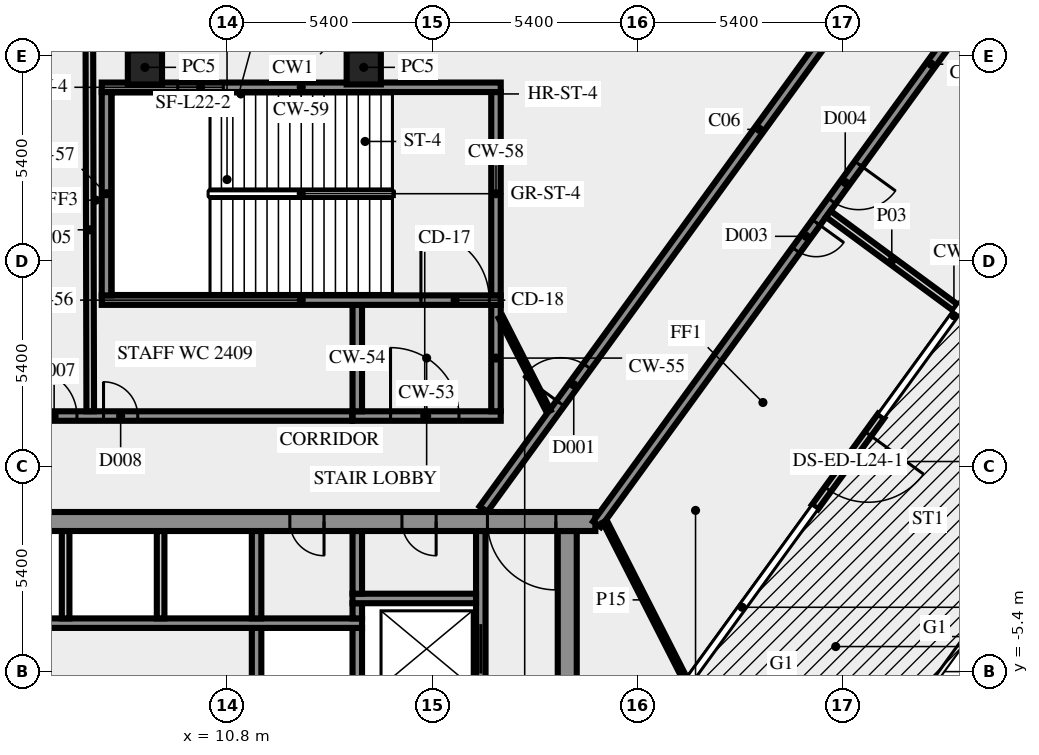
"""IFC4 building model, lengths in metres.
Left out: names, types, materials, properties, quantities, classifications, styles, units other than length and angle.
Written with IfcOpenShell. Run it as: python <this file> out.ifc"""

import sys

from ifc_helpers import new_model, si_unit, direction, frame, frame_2d, origin, origin_2d, place, context, subcontext, project, spatial, rectangle, extrude, element, fill, save


model = new_model("IFC4")
c1 = context("Model", 3, precision=1e-05, world=origin(), true_north=direction((0.0, 1.0)))
c2 = subcontext(c1, "Body", "Model", "MODEL_VIEW")
j1 = project(units=[si_unit("LENGTHUNIT", "METRE"), si_unit("PLANEANGLEUNIT", "RADIAN")], contexts=[c1])
p1 = place(None, origin())
s1 = spatial("IfcSite", under=j1, at=p1, CompositionType="ELEMENT")
p2 = place(p1, origin())
s2 = spatial("IfcBuilding", under=s1, at=p2, CompositionType="ELEMENT")
p3 = place(p2, frame((0.0, 0.0, 105.0)))
s3 = spatial("IfcBuildingStorey", under=s2, at=p3, CompositionType="ELEMENT", Elevation=105.0)
for number, where, z_axis, x_axis in (
    (1, (14.395, 10.5, 0.0), (0.0, 0.0, 1.0), (-1.0, 0.0, 0.0)),
    (2, (8.637, 10.5, 0.0), (0.0, 0.0, 1.0), (-1.0, 0.0, 0.0)),
):
    element("IfcColumn", number, at=place(p3, frame(where, z_axis=z_axis, x_axis=x_axis)), inside=s3, PredefinedType="COLUMN", context=c2, shape_type="SweptSolid", body=[
        extrude(rectangle(XDim=0.9, YDim=0.9, at=origin_2d()), origin(), (0.0, 0.0, 1.0), 3.65),
    ])
p4 = place(p3, frame((28.01, 1.327, 0.0), z_axis=(0.0, 0.0, 1.0), x_axis=(-0.587735577821, -0.809053082661, 0.0)))
e3 = element("IfcWall", 3, at=p4, inside=s3, PredefinedType="SOLIDWALL", context=c2, shape_type="SweptSolid", body=[
    extrude(rectangle(XDim=2.963, YDim=0.2, at=frame_2d((1.481, 0.0))), origin(), (0.0, 0.0, 1.0), 3.65),
])
p5 = place(p4, frame((0.582, 0.0, 0.0)))
e4 = element("IfcOpeningElement", 4, at=p5, cuts=e3, PredefinedType="OPENING", context=c2, shape_type="SweptSolid", body=[
    extrude(rectangle(XDim=1.8, YDim=2.4, at=frame_2d((0.9, 1.2))), frame((0.0, 0.11, 0.0), z_axis=(0.0, -1.0, 0.0), x_axis=(1.0, 0.0, 0.0)), (0.0, 0.0, 1.0), 0.22),
])
p6 = place(p3, frame((19.75, -10.5, 0.0), z_axis=(0.0, 0.0, 1.0), x_axis=(0.0, 1.0, 0.0)))
e5 = element("IfcWall", 5, at=p6, inside=s3, PredefinedType="SHEAR", context=c2, shape_type="SweptSolid", body=[
    extrude(rectangle(XDim=8.8, YDim=0.5, at=frame_2d((4.4, 0.0))), origin(), (0.0, 0.0, 1.0), 3.65),
])
for number, where, z_axis, x_axis in (
    (6, (11.575, -6.0, 0.0), (0.0, 0.0, 1.0), (0.0, 1.0, 0.0)),
    (7, (14.225, -6.0, 0.0), (0.0, 0.0, 1.0), (0.0, 1.0, 0.0)),
):
    element("IfcWall", number, at=place(p3, frame(where, z_axis=z_axis, x_axis=x_axis)), inside=s3, PredefinedType="SHEAR", context=c2, shape_type="SweptSolid", body=[
        extrude(rectangle(XDim=1.75, YDim=0.25, at=frame_2d((0.875, 0.0))), origin(), (0.0, 0.0, 1.0), 3.65),
    ])
p7 = place(p3, frame((17.475, -6.0, 0.0), z_axis=(0.0, 0.0, 1.0), x_axis=(0.0, 1.0, 0.0)))
e8 = element("IfcWall", 8, at=p7, inside=s3, PredefinedType="SHEAR", context=c2, shape_type="SweptSolid", body=[
    extrude(rectangle(XDim=4.3, YDim=0.25, at=frame_2d((2.15, 0.0))), origin(), (0.0, 0.0, 1.0), 3.65),
])
p8 = place(p7, frame((0.55, 0.0, 0.0)))
e9 = element("IfcOpeningElement", 9, at=p8, cuts=e8, PredefinedType="OPENING", context=c2, shape_type="SweptSolid", body=[
    extrude(rectangle(XDim=1.3, YDim=2.1, at=frame_2d((0.65, 1.05))), frame((0.0, 0.135, 0.0), z_axis=(0.0, -1.0, 0.0), x_axis=(1.0, 0.0, 0.0)), (0.0, 0.0, 1.0), 0.27),
])
p9 = place(p3, frame((1.45, -4.125, 0.0), z_axis=(0.0, 0.0, 1.0), x_axis=(1.0, 0.0, 0.0)))
e10 = element("IfcWall", 10, at=p9, inside=s3, PredefinedType="SHEAR", context=c2, shape_type="SweptSolid", body=[
    extrude(rectangle(XDim=12.9, YDim=0.25, at=frame_2d((6.45, 0.0))), origin(), (0.0, 0.0, 1.0), 3.65),
])
p10 = place(p9, frame((0.7, 0.0, 0.0)))
e11 = element("IfcOpeningElement", 11, at=p10, cuts=e10, PredefinedType="OPENING", context=c2, shape_type="SweptSolid", body=[
    extrude(rectangle(XDim=1.3, YDim=2.1, at=frame_2d((0.65, 1.05))), frame((0.0, 0.135, 0.0), z_axis=(0.0, -1.0, 0.0), x_axis=(1.0, 0.0, 0.0)), (0.0, 0.0, 1.0), 0.27),
])
for number, where, z_axis, x_axis in (
    (12, (6.55, -4.0, 0.0), (0.0, 0.0, 1.0), (0.0, 1.0, 0.0)),
    (13, (9.05, -4.0, 0.0), (0.0, 0.0, 1.0), (0.0, 1.0, 0.0)),
):
    element("IfcWall", number, at=place(p3, frame(where, z_axis=z_axis, x_axis=x_axis)), inside=s3, PredefinedType="SOLIDWALL", context=c2, shape_type="SweptSolid", body=[
        extrude(rectangle(XDim=2.3, YDim=0.2, at=frame_2d((1.15, 0.0))), origin(), (0.0, 0.0, 1.0), 3.65),
    ])
p11 = place(p3, frame((11.575, -4.0, 0.0), z_axis=(0.0, 0.0, 1.0), x_axis=(0.0, 1.0, 0.0)))
e14 = element("IfcWall", 14, at=p11, inside=s3, PredefinedType="SHEAR", context=c2, shape_type="SweptSolid", body=[
    extrude(rectangle(XDim=2.3, YDim=0.25, at=frame_2d((1.15, 0.0))), origin(), (0.0, 0.0, 1.0), 3.65),
])
p12 = place(p3, frame((14.225, -4.0, 0.0), z_axis=(0.0, 0.0, 1.0), x_axis=(0.0, 1.0, 0.0)))
e15 = element("IfcWall", 15, at=p12, inside=s3, PredefinedType="SHEAR", context=c2, shape_type="SweptSolid", body=[
    extrude(rectangle(XDim=0.4, YDim=0.25, at=frame_2d((0.2, 0.0))), origin(), (0.0, 0.0, 1.0), 3.65),
])
p13 = place(p3, frame((14.1, -3.475, 0.0), z_axis=(0.0, 0.0, 1.0), x_axis=(1.0, 0.0, 0.0)))
e16 = element("IfcWall", 16, at=p13, inside=s3, PredefinedType="SHEAR", context=c2, shape_type="SweptSolid", body=[
    extrude(rectangle(XDim=3.25, YDim=0.25, at=frame_2d((1.625, 0.0))), origin(), (0.0, 0.0, 1.0), 3.65),
])
p14 = place(p3, frame((14.225, -3.35, 0.0), z_axis=(0.0, 0.0, 1.0), x_axis=(0.0, 1.0, 0.0)))
e17 = element("IfcWall", 17, at=p14, inside=s3, PredefinedType="SHEAR", context=c2, shape_type="SweptSolid", body=[
    extrude(rectangle(XDim=1.65, YDim=0.25, at=frame_2d((0.825, 0.0))), origin(), (0.0, 0.0, 1.0), 3.65),
])
p15 = place(p3, frame((20.49, -1.45, 0.0), z_axis=(0.0, 0.0, 1.0), x_axis=(-1.0, 0.0, 0.0)))
e18 = element("IfcWall", 18, at=p15, inside=s3, PredefinedType="SHEAR", context=c2, shape_type="SweptSolid", body=[
    extrude(rectangle(XDim=40.98, YDim=0.5, at=frame_2d((20.49, 0.0))), origin(), (0.0, 0.0, 1.0), 3.65),
])
p16 = place(p15, frame((38.14, 0.0, 0.0)))
e19 = element("IfcOpeningElement", 19, at=p16, cuts=e18, PredefinedType="OPENING", context=c2, shape_type="SweptSolid", body=[
    extrude(rectangle(XDim=1.8, YDim=2.1, at=frame_2d((0.9, 1.05))), frame((0.0, 0.26, 0.0), z_axis=(0.0, -1.0, 0.0), x_axis=(1.0, 0.0, 0.0)), (0.0, 0.0, 1.0), 0.52),
])
p17 = place(p15, frame((36.728, 0.0, 0.0)))
e20 = element("IfcOpeningElement", 20, at=p17, cuts=e18, PredefinedType="OPENING", context=c2, shape_type="SweptSolid", body=[
    extrude(rectangle(XDim=0.8, YDim=2.1, at=frame_2d((0.4, 1.05))), frame((0.0, 0.26, 0.0), z_axis=(0.0, -1.0, 0.0), x_axis=(1.0, 0.0, 0.0)), (0.0, 0.0, 1.0), 0.52),
])
p18 = place(p15, frame((35.153, 0.0, 0.0)))
e21 = element("IfcOpeningElement", 21, at=p18, cuts=e18, PredefinedType="OPENING", context=c2, shape_type="SweptSolid", body=[
    extrude(rectangle(XDim=0.8, YDim=2.1, at=frame_2d((0.4, 1.05))), frame((0.0, 0.26, 0.0), z_axis=(0.0, -1.0, 0.0), x_axis=(1.0, 0.0, 0.0)), (0.0, 0.0, 1.0), 0.52),
])
p19 = place(p15, frame((32.94, 0.0, 0.0)))
e22 = element("IfcOpeningElement", 22, at=p19, cuts=e18, PredefinedType="OPENING", context=c2, shape_type="SweptSolid", body=[
    extrude(rectangle(XDim=0.9, YDim=2.1, at=frame_2d((0.45, 1.05))), frame((0.0, 0.26, 0.0), z_axis=(0.0, -1.0, 0.0), x_axis=(1.0, 0.0, 0.0)), (0.0, 0.0, 1.0), 0.52),
])
p20 = place(p15, frame((19.59, 0.0, 0.0)))
e23 = element("IfcOpeningElement", 23, at=p20, cuts=e18, PredefinedType="OPENING", context=c2, shape_type="SweptSolid", body=[
    extrude(rectangle(XDim=2.0, YDim=2.1, at=frame_2d((1.0, 1.05))), frame((0.0, 0.26, 0.0), z_axis=(0.0, -1.0, 0.0), x_axis=(1.0, 0.0, 0.0)), (0.0, 0.0, 1.0), 0.52),
])
p21 = place(p15, frame((7.14, 0.0, 0.0)))
e24 = element("IfcOpeningElement", 24, at=p21, cuts=e18, PredefinedType="OPENING", context=c2, shape_type="SweptSolid", body=[
    extrude(rectangle(XDim=0.9, YDim=2.1, at=frame_2d((0.45, 1.05))), frame((0.0, 0.26, 0.0), z_axis=(0.0, -1.0, 0.0), x_axis=(1.0, 0.0, 0.0)), (0.0, 0.0, 1.0), 0.52),
])
p22 = place(p15, frame((4.19, 0.0, 0.0)))
e25 = element("IfcOpeningElement", 25, at=p22, cuts=e18, PredefinedType="OPENING", context=c2, shape_type="SweptSolid", body=[
    extrude(rectangle(XDim=0.9, YDim=2.1, at=frame_2d((0.45, 1.05))), frame((0.0, 0.26, 0.0), z_axis=(0.0, -1.0, 0.0), x_axis=(1.0, 0.0, 0.0)), (0.0, 0.0, 1.0), 0.52),
])
p23 = place(p15, frame((1.04, 0.0, 0.0)))
e26 = element("IfcOpeningElement", 26, at=p23, cuts=e18, PredefinedType="OPENING", context=c2, shape_type="SweptSolid", body=[
    extrude(rectangle(XDim=1.8, YDim=2.1, at=frame_2d((0.9, 1.05))), frame((0.0, 0.26, 0.0), z_axis=(0.0, -1.0, 0.0), x_axis=(1.0, 0.0, 0.0)), (0.0, 0.0, 1.0), 0.52),
])
p24 = place(p3, frame((14.1, 1.325, 0.0), z_axis=(0.0, 0.0, 1.0), x_axis=(1.0, 0.0, 0.0)))
e27 = element("IfcWall", 27, at=p24, inside=s3, PredefinedType="SHEAR", context=c2, shape_type="SweptSolid", body=[
    extrude(rectangle(XDim=3.9, YDim=0.25, at=frame_2d((1.95, 0.0))), origin(), (0.0, 0.0, 1.0), 3.65),
])
p25 = place(p24, frame((1.0, 0.0, 0.0)))
e28 = element("IfcOpeningElement", 28, at=p25, cuts=e27, PredefinedType="OPENING", context=c2, shape_type="SweptSolid", body=[
    extrude(rectangle(XDim=1.8, YDim=2.1, at=frame_2d((0.9, 1.05))), frame((0.0, 0.135, 0.0), z_axis=(0.0, -1.0, 0.0), x_axis=(1.0, 0.0, 0.0)), (0.0, 0.0, 1.0), 0.27),
])
for number, where, z_axis, x_axis in (
    (29, (14.225, 1.45, 0.0), (0.0, 0.0, 1.0), (0.0, 1.0, 0.0)),
    (30, (17.875, 1.45, 0.0), (0.0, 0.0, 1.0), (0.0, 1.0, 0.0)),
):
    element("IfcWall", number, at=place(p3, frame(where, z_axis=z_axis, x_axis=x_axis)), inside=s3, PredefinedType="SHEAR", context=c2, shape_type="SweptSolid", body=[
        extrude(rectangle(XDim=2.8, YDim=0.25, at=frame_2d((1.4, 0.0))), origin(), (0.0, 0.0, 1.0), 3.65),
    ])
p26 = place(p3, frame((7.5, 4.375, 0.0), z_axis=(0.0, 0.0, 1.0), x_axis=(1.0, 0.0, 0.0)))
e31 = element("IfcWall", 31, at=p26, inside=s3, PredefinedType="SHEAR", context=c2, shape_type="SweptSolid", body=[
    extrude(rectangle(XDim=10.5, YDim=0.25, at=frame_2d((5.25, 0.0))), origin(), (0.0, 0.0, 1.0), 3.65),
])
p27 = place(p26, frame((8.4, 0.0, 0.0)))
e32 = element("IfcOpeningElement", 32, at=p27, cuts=e31, PredefinedType="OPENING", context=c2, shape_type="SweptSolid", body=[
    extrude(rectangle(XDim=1.8, YDim=2.1, at=frame_2d((0.9, 1.05))), frame((0.0, 0.135, 0.0), z_axis=(0.0, -1.0, 0.0), x_axis=(1.0, 0.0, 0.0)), (0.0, 0.0, 1.0), 0.27),
])
for number, where, z_axis, x_axis in (
    (33, (7.625, 4.5, 0.0), (0.0, 0.0, 1.0), (0.0, 1.0, 0.0)),
    (34, (17.875, 4.5, 0.0), (0.0, 0.0, 1.0), (0.0, 1.0, 0.0)),
):
    element("IfcWall", number, at=place(p3, frame(where, z_axis=z_axis, x_axis=x_axis)), inside=s3, PredefinedType="SHEAR", context=c2, shape_type="SweptSolid", body=[
        extrude(rectangle(XDim=5.35, YDim=0.25, at=frame_2d((2.675, 0.0))), origin(), (0.0, 0.0, 1.0), 3.65),
    ])
p28 = place(p3, frame((7.5, 9.975, 0.0), z_axis=(0.0, 0.0, 1.0), x_axis=(1.0, 0.0, 0.0)))
e35 = element("IfcWall", 35, at=p28, inside=s3, PredefinedType="SHEAR", context=c2, shape_type="SweptSolid", body=[
    extrude(rectangle(XDim=10.5, YDim=0.25, at=frame_2d((5.25, 0.0))), origin(), (0.0, 0.0, 1.0), 3.65),
])
p29 = place(p28, frame((2.0, 0.0, 1.0)))
e36 = element("IfcOpeningElement", 36, at=p29, cuts=e35, PredefinedType="OPENING", context=c2, shape_type="SweptSolid", body=[
    extrude(rectangle(XDim=1.2, YDim=1.2, at=frame_2d((0.6, 0.6))), frame((0.0, 0.135, 0.0), z_axis=(0.0, -1.0, 0.0), x_axis=(1.0, 0.0, 0.0)), (0.0, 0.0, 1.0), 0.27),
])
p30 = place(p3, frame((-14.09, 1.325, 0.0), z_axis=(0.0, 0.0, 1.0), x_axis=(1.0, 0.0, 0.0)))
e37 = element("IfcWall", 37, at=p30, inside=s3, PredefinedType="SOLIDWALL", context=c2, shape_type="SweptSolid", body=[
    extrude(rectangle(XDim=28.18, YDim=0.25, at=frame_2d((14.09, 0.0))), origin(), (0.0, 0.0, 1.0), 3.65),
])
p31 = place(p30, frame((19.738, 0.0, 0.0)))
e38 = element("IfcOpeningElement", 38, at=p31, cuts=e37, PredefinedType="OPENING", context=c2, shape_type="SweptSolid", body=[
    extrude(rectangle(XDim=1.2, YDim=2.1, at=frame_2d((0.6, 1.05))), frame((0.0, 0.135, 0.0), z_axis=(0.0, -1.0, 0.0), x_axis=(1.0, 0.0, 0.0)), (0.0, 0.0, 1.0), 0.27),
])
p32 = place(p30, frame((0.34, 0.0, 0.0)))
e39 = element("IfcOpeningElement", 39, at=p32, cuts=e37, PredefinedType="OPENING", context=c2, shape_type="SweptSolid", body=[
    extrude(rectangle(XDim=0.9, YDim=2.1, at=frame_2d((0.45, 1.05))), frame((0.0, 0.135, 0.0), z_axis=(0.0, -1.0, 0.0), x_axis=(1.0, 0.0, 0.0)), (0.0, 0.0, 1.0), 0.27),
])
p33 = place(p30, frame((21.638, 0.0, 0.0)))
e40 = element("IfcOpeningElement", 40, at=p33, cuts=e37, PredefinedType="OPENING", context=c2, shape_type="SweptSolid", body=[
    extrude(rectangle(XDim=0.9, YDim=2.1, at=frame_2d((0.45, 1.05))), frame((0.0, 0.135, 0.0), z_axis=(0.0, -1.0, 0.0), x_axis=(1.0, 0.0, 0.0)), (0.0, 0.0, 1.0), 0.27),
])
p34 = place(p3, frame((17.545, -1.125, 0.0), z_axis=(0.0, 0.0, 1.0), x_axis=(0.587791430994, 0.80901250525, 0.0)))
e41 = element("IfcWall", 41, at=p34, inside=s3, PredefinedType="SOLIDWALL", context=c2, shape_type="SweptSolid", body=[
    extrude(rectangle(XDim=24.703, YDim=0.25, at=frame_2d((12.352, 0.0))), origin(), (0.0, 0.0, 1.0), 3.65),
])
p35 = place(p34, frame((3.442, 0.0, 0.0)))
e42 = element("IfcOpeningElement", 42, at=p35, cuts=e41, PredefinedType="OPENING", context=c2, shape_type="SweptSolid", body=[
    extrude(rectangle(XDim=1.2, YDim=2.1, at=frame_2d((0.6, 1.05))), frame((0.0, 0.135, 0.0), z_axis=(0.0, -1.0, 0.0), x_axis=(1.0, 0.0, 0.0)), (0.0, 0.0, 1.0), 0.27),
])
p36 = place(p34, frame((23.329, 0.0, 0.0)))
e43 = element("IfcOpeningElement", 43, at=p36, cuts=e41, PredefinedType="OPENING", context=c2, shape_type="SweptSolid", body=[
    extrude(rectangle(XDim=0.9, YDim=2.1, at=frame_2d((0.45, 1.05))), frame((0.0, 0.135, 0.0), z_axis=(0.0, -1.0, 0.0), x_axis=(1.0, 0.0, 0.0)), (0.0, 0.0, 1.0), 0.27),
])
p37 = place(p3, frame((34.062, 17.101, 0.0), z_axis=(0.0, 0.0, 1.0), x_axis=(-0.58778129431, -0.809019870003, 0.0)))
e44 = element("IfcWall", 44, at=p37, inside=s3, PredefinedType="SOLIDWALL", context=c2, shape_type="SweptSolid", body=[
    extrude(rectangle(XDim=23.021, YDim=0.25, at=frame_2d((11.51, 0.0))), origin(), (0.0, 0.0, 1.0), 3.65),
])
p38 = place(p37, frame((11.304, 0.0, 0.0)))
e45 = element("IfcOpeningElement", 45, at=p38, cuts=e44, PredefinedType="OPENING", context=c2, shape_type="SweptSolid", body=[
    extrude(rectangle(XDim=1.2, YDim=2.1, at=frame_2d((0.6, 1.05))), frame((0.0, 0.135, 0.0), z_axis=(0.0, -1.0, 0.0), x_axis=(1.0, 0.0, 0.0)), (0.0, 0.0, 1.0), 0.27),
])
p39 = place(p37, frame((13.205, 0.0, 0.0)))
e46 = element("IfcOpeningElement", 46, at=p39, cuts=e44, PredefinedType="OPENING", context=c2, shape_type="SweptSolid", body=[
    extrude(rectangle(XDim=0.9, YDim=2.1, at=frame_2d((0.45, 1.05))), frame((0.0, 0.135, 0.0), z_axis=(0.0, -1.0, 0.0), x_axis=(1.0, 0.0, 0.0)), (0.0, 0.0, 1.0), 0.27),
])
p40 = place(p3, frame((26.619, 6.643, 0.0), z_axis=(0.0, 0.0, 1.0), x_axis=(0.805298264495, -0.592869888931, 0.0)))
e47 = element("IfcWall", 47, at=p40, inside=s3, PredefinedType="SOLIDWALL", context=c2, shape_type="SweptSolid", body=[
    extrude(rectangle(XDim=4.15, YDim=0.2, at=frame_2d((2.075, 0.0))), origin(), (0.0, 0.0, 1.0), 3.65),
])
p41 = place(p3, frame((7.198, 1.45, 0.0), z_axis=(0.0, 0.0, 1.0), x_axis=(-0.002377476217, 0.999997173799, 0.0)))
e48 = element("IfcWall", 48, at=p41, inside=s3, PredefinedType="SOLIDWALL", context=c2, shape_type="SweptSolid", body=[
    extrude(rectangle(XDim=9.55, YDim=0.2, at=frame_2d((4.775, 0.0))), origin(), (0.0, 0.0, 1.0), 2.75),
])
p42 = place(p3, frame((18.0, 3.925, 0.0), z_axis=(0.0, 0.0, 1.0), x_axis=(0.453950796792, -0.891026752736, 0.0)))
e49 = element("IfcWall", 49, at=p42, inside=s3, PredefinedType="PARTITIONING", context=c2, shape_type="SweptSolid", body=[
    extrude(rectangle(XDim=2.778, YDim=0.12, at=frame_2d((1.389, 0.0))), origin(), (0.0, 0.0, 1.0), 3.65),
])
p43 = place(p3, frame((20.739, -1.45, 0.0), z_axis=(0.0, 0.0, 1.0), x_axis=(0.453952647408, -0.891025809902, 0.0)))
e50 = element("IfcWall", 50, at=p43, inside=s3, PredefinedType="PARTITIONING", context=c2, shape_type="SweptSolid", body=[
    extrude(rectangle(XDim=4.628, YDim=0.12, at=frame_2d((2.314, 0.0))), origin(), (0.0, 0.0, 1.0), 3.65),
])
p44 = place(p5, origin())
e51 = element("IfcDoor", 51, at=p44, inside=s3, OperationType="DOUBLE_DOOR_SINGLE_SWING", PredefinedType="DOOR", context=c2, shape_type="SweptSolid", body=[
    extrude(rectangle(XDim=1.8, YDim=2.4, at=frame_2d((0.9, 1.2))), frame((0.0, 0.025, 0.0), z_axis=(0.0, -1.0, 0.0), x_axis=(1.0, 0.0, 0.0)), (0.0, 0.0, 1.0), 0.05),
])
fill(e4, e51)
p45 = place(p8, origin())
e52 = element("IfcDoor", 52, at=p45, inside=s3, OperationType="DOUBLE_DOOR_SLIDING", PredefinedType="DOOR", context=c2, shape_type="SweptSolid", body=[
    extrude(rectangle(XDim=1.3, YDim=2.1, at=frame_2d((0.65, 1.05))), frame((0.0, 0.025, 0.0), z_axis=(0.0, -1.0, 0.0), x_axis=(1.0, 0.0, 0.0)), (0.0, 0.0, 1.0), 0.05),
])
fill(e9, e52)
p46 = place(p21, origin())
e53 = element("IfcDoor", 53, at=p46, inside=s3, OperationType="SINGLE_SWING_LEFT", PredefinedType="DOOR", context=c2, shape_type="SweptSolid", body=[
    extrude(rectangle(XDim=0.9, YDim=2.1, at=frame_2d((0.45, 1.05))), frame((0.0, 0.025, 0.0), z_axis=(0.0, -1.0, 0.0), x_axis=(1.0, 0.0, 0.0)), (0.0, 0.0, 1.0), 0.05),
])
fill(e24, e53)
p47 = place(p22, origin())
e54 = element("IfcDoor", 54, at=p47, inside=s3, OperationType="SINGLE_SWING_LEFT", PredefinedType="DOOR", context=c2, shape_type="SweptSolid", body=[
    extrude(rectangle(XDim=0.9, YDim=2.1, at=frame_2d((0.45, 1.05))), frame((0.0, 0.025, 0.0), z_axis=(0.0, -1.0, 0.0), x_axis=(1.0, 0.0, 0.0)), (0.0, 0.0, 1.0), 0.05),
])
fill(e25, e54)
p48 = place(p23, origin())
e55 = element("IfcDoor", 55, at=p48, inside=s3, OperationType="DOUBLE_DOOR_SINGLE_SWING", PredefinedType="DOOR", context=c2, shape_type="SweptSolid", body=[
    extrude(rectangle(XDim=1.8, YDim=2.1, at=frame_2d((0.9, 1.05))), frame((0.0, 0.025, 0.0), z_axis=(0.0, -1.0, 0.0), x_axis=(1.0, 0.0, 0.0)), (0.0, 0.0, 1.0), 0.05),
])
fill(e26, e55)
p49 = place(p25, origin())
e56 = element("IfcDoor", 56, at=p49, inside=s3, OperationType="DOUBLE_DOOR_SINGLE_SWING", PredefinedType="DOOR", context=c2, shape_type="SweptSolid", body=[
    extrude(rectangle(XDim=1.8, YDim=2.1, at=frame_2d((0.9, 1.05))), frame((0.0, 0.025, 0.0), z_axis=(0.0, -1.0, 0.0), x_axis=(1.0, 0.0, 0.0)), (0.0, 0.0, 1.0), 0.05),
])
fill(e28, e56)
p50 = place(p27, origin())
e57 = element("IfcDoor", 57, at=p50, inside=s3, OperationType="DOUBLE_DOOR_SINGLE_SWING", PredefinedType="DOOR", context=c2, shape_type="SweptSolid", body=[
    extrude(rectangle(XDim=1.8, YDim=2.1, at=frame_2d((0.9, 1.05))), frame((0.0, 0.025, 0.0), z_axis=(0.0, -1.0, 0.0), x_axis=(1.0, 0.0, 0.0)), (0.0, 0.0, 1.0), 0.05),
])
fill(e32, e57)
p51 = place(p29, origin())
e58 = element("IfcWindow", 58, at=p51, inside=s3, PartitioningType="SINGLE_PANEL", PredefinedType="WINDOW", context=c2, shape_type="SweptSolid", body=[
    extrude(rectangle(XDim=1.2, YDim=1.2, at=frame_2d((0.6, 0.6))), frame((0.0, 0.03, 0.0), z_axis=(0.0, -1.0, 0.0), x_axis=(1.0, 0.0, 0.0)), (0.0, 0.0, 1.0), 0.06),
])
fill(e36, e58)
p52 = place(p35, origin())
e59 = element("IfcDoor", 59, at=p52, inside=s3, OperationType="SINGLE_SWING_LEFT", PredefinedType="DOOR", context=c2, shape_type="SweptSolid", body=[
    extrude(rectangle(XDim=1.2, YDim=2.1, at=frame_2d((0.6, 1.05))), frame((0.0, 0.025, 0.0), z_axis=(0.0, -1.0, 0.0), x_axis=(1.0, 0.0, 0.0)), (0.0, 0.0, 1.0), 0.05),
])
fill(e42, e59)
p53 = place(p38, origin())
e60 = element("IfcDoor", 60, at=p53, inside=s3, OperationType="SINGLE_SWING_RIGHT", PredefinedType="DOOR", context=c2, shape_type="SweptSolid", body=[
    extrude(rectangle(XDim=1.2, YDim=2.1, at=frame_2d((0.6, 1.05))), frame((0.0, 0.025, 0.0), z_axis=(0.0, -1.0, 0.0), x_axis=(1.0, 0.0, 0.0)), (0.0, 0.0, 1.0), 0.05),
])
fill(e45, e60)
p54 = place(p31, origin())
e61 = element("IfcDoor", 61, at=p54, inside=s3, OperationType="SINGLE_SWING_RIGHT", PredefinedType="DOOR", context=c2, shape_type="SweptSolid", body=[
    extrude(rectangle(XDim=1.2, YDim=2.1, at=frame_2d((0.6, 1.05))), frame((0.0, 0.025, 0.0), z_axis=(0.0, -1.0, 0.0), x_axis=(1.0, 0.0, 0.0)), (0.0, 0.0, 1.0), 0.05),
])
fill(e38, e61)
p55 = place(p39, origin())
e62 = element("IfcDoor", 62, at=p55, inside=s3, OperationType="SINGLE_SWING_LEFT", PredefinedType="DOOR", context=c2, shape_type="SweptSolid", body=[
    extrude(rectangle(XDim=0.9, YDim=2.1, at=frame_2d((0.45, 1.05))), frame((0.0, 0.025, 0.0), z_axis=(0.0, -1.0, 0.0), x_axis=(1.0, 0.0, 0.0)), (0.0, 0.0, 1.0), 0.05),
])
fill(e46, e62)
p56 = place(p33, origin())
e63 = element("IfcDoor", 63, at=p56, inside=s3, OperationType="SINGLE_SWING_LEFT", PredefinedType="DOOR", context=c2, shape_type="SweptSolid", body=[
    extrude(rectangle(XDim=0.9, YDim=2.1, at=frame_2d((0.45, 1.05))), frame((0.0, 0.025, 0.0), z_axis=(0.0, -1.0, 0.0), x_axis=(1.0, 0.0, 0.0)), (0.0, 0.0, 1.0), 0.05),
])
fill(e40, e63)
save(model, sys.argv[1])
